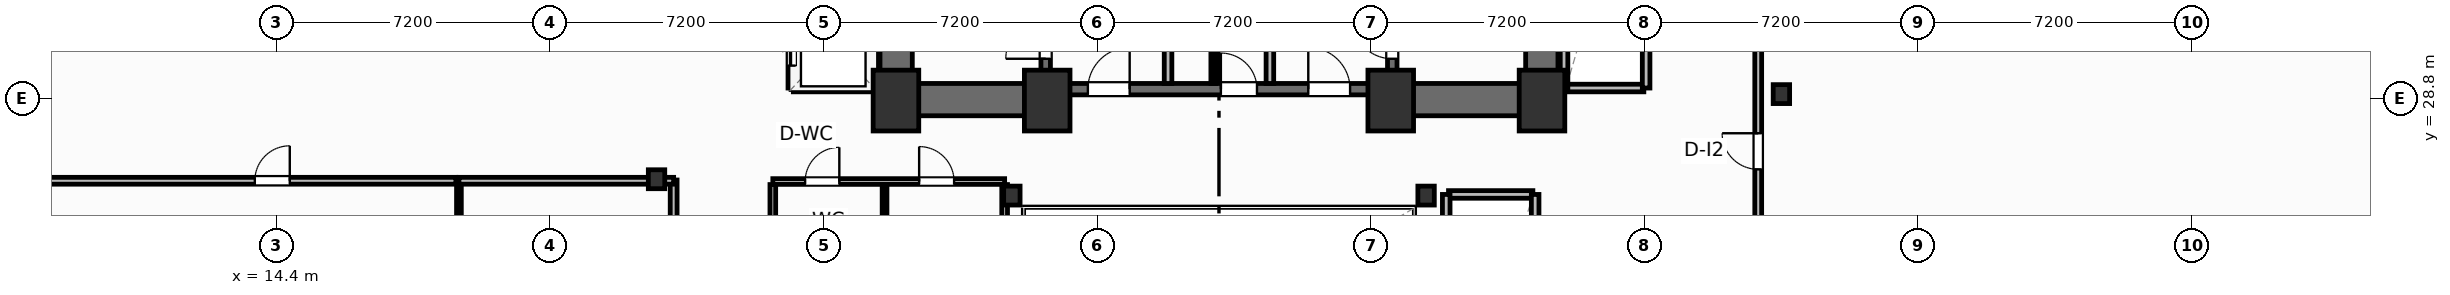
"""IFC4 building model, lengths in metres.
Left out: names, types, materials, properties, quantities, classifications, styles, units other than length and angle.
Written with IfcOpenShell. Run it as: python <this file> out.ifc"""

import sys

from ifc_helpers import new_model, si_unit, direction, frame, frame_2d, origin, origin_2d, place, context, subcontext, project, spatial, rectangle, i_section, extrude, element, fill, save


model = new_model("IFC4")
c1 = context("Model", 3, precision=1e-05, world=origin(), true_north=direction((0.0, 1.0)))
c2 = subcontext(c1, "Body", "Model", "MODEL_VIEW")
j1 = project(units=[si_unit("LENGTHUNIT", "METRE"), si_unit("PLANEANGLEUNIT", "RADIAN")], contexts=[c1])
p1 = place(None, origin())
s1 = spatial("IfcSite", under=j1, at=p1, CompositionType="ELEMENT")
p2 = place(p1, origin())
s2 = spatial("IfcBuilding", under=s1, at=p2, CompositionType="ELEMENT")
p3 = place(p2, frame((0.0, 0.0, 49.2)))
s3 = spatial("IfcBuildingStorey", under=s2, at=p3, CompositionType="ELEMENT", Elevation=49.2)
for number, where, z_axis, x_axis in (
    (1, (30.7, 28.75, 0.0), (0.0, 0.0, 1.0), (1.0, 0.0, 0.0)),
    (2, (34.68, 28.75, 0.0), (0.0, 0.0, 1.0), (1.0, 0.0, 0.0)),
    (3, (43.72, 28.75, 0.0), (0.0, 0.0, 1.0), (1.0, 0.0, 0.0)),
    (4, (47.7, 28.75, 0.0), (0.0, 0.0, 1.0), (1.0, 0.0, 0.0)),
):
    element("IfcColumn", number, at=place(p3, frame(where, z_axis=z_axis, x_axis=x_axis)), inside=s3, PredefinedType="COLUMN", context=c2, shape_type="SweptSolid", body=[
        extrude(rectangle(XDim=1.2, YDim=1.6, at=origin_2d()), origin(), (0.0, 0.0, 1.0), 3.7),
    ])
for number, where, z_axis, x_axis in (
    (5, (33.75, 26.25, 0.0), (0.0, 0.0, 1.0), (1.0, 0.0, 0.0)),
    (6, (44.65, 26.25, 0.0), (0.0, 0.0, 1.0), (1.0, 0.0, 0.0)),
    (7, (24.4, 26.68, 0.0), (0.0, 0.0, 1.0), (1.0, 0.0, 0.0)),
    (8, (54.0, 28.92, 0.0), (0.0, 0.0, 1.0), (1.0, 0.0, 0.0)),
):
    element("IfcColumn", number, at=place(p3, frame(where, z_axis=z_axis, x_axis=x_axis)), inside=s3, PredefinedType="COLUMN", context=c2, shape_type="SweptSolid", body=[
        extrude(i_section(OverallWidth=0.432, OverallDepth=0.498, WebThickness=0.056, FlangeThickness=0.089, FilletRadius=0.025, at=origin_2d()), origin(), (0.0, 0.0, 1.0), 3.7),
    ])
for number, where, z_axis, x_axis in (
    (9, (30.705, 29.2, 0.0), (0.0, 0.0, 1.0), (0.0, 1.0, 0.0)),
    (10, (47.695, 29.2, 0.0), (0.0, 0.0, 1.0), (0.0, 1.0, 0.0)),
):
    element("IfcWall", number, at=place(p3, frame(where, z_axis=z_axis, x_axis=x_axis)), inside=s3, PredefinedType="SHEAR", context=c2, shape_type="SweptSolid", body=[
        extrude(rectangle(XDim=9.22, YDim=0.85, at=frame_2d((4.61, 0.0))), origin(), (0.0, 0.0, 1.0), 3.45),
    ])
for number, where, z_axis, x_axis in (
    (11, (30.28, 28.775, 0.0), (0.0, 0.0, 1.0), (1.0, 0.0, 0.0)),
    (12, (43.6, 28.775, 0.0), (0.0, 0.0, 1.0), (1.0, 0.0, 0.0)),
):
    element("IfcWall", number, at=place(p3, frame(where, z_axis=z_axis, x_axis=x_axis)), inside=s3, PredefinedType="SHEAR", context=c2, shape_type="SweptSolid", body=[
        extrude(rectangle(XDim=4.52, YDim=0.85, at=frame_2d((2.26, 0.0))), origin(), (0.0, 0.0, 1.0), 3.45),
    ])
p4 = place(p3, frame((34.8, 29.05, 0.0), z_axis=(0.0, 0.0, 1.0), x_axis=(1.0, 0.0, 0.0)))
e13 = element("IfcWall", 13, at=p4, inside=s3, PredefinedType="SHEAR", context=c2, shape_type="SweptSolid", body=[
    extrude(rectangle(XDim=8.8, YDim=0.3, at=frame_2d((4.4, 0.0))), origin(), (0.0, 0.0, 1.0), 3.45),
])
p5 = place(p4, frame((0.95, 0.0, 0.0)))
e14 = element("IfcOpeningElement", 14, at=p5, cuts=e13, PredefinedType="OPENING", context=c2, shape_type="SweptSolid", body=[
    extrude(rectangle(XDim=1.1, YDim=2.15, at=frame_2d((0.55, 1.075))), frame((0.0, 0.16, 0.0), z_axis=(0.0, -1.0, 0.0), x_axis=(1.0, 0.0, 0.0)), (0.0, 0.0, 1.0), 0.32),
])
p6 = place(p4, frame((6.75, 0.0, 0.0)))
e15 = element("IfcOpeningElement", 15, at=p6, cuts=e13, PredefinedType="OPENING", context=c2, shape_type="SweptSolid", body=[
    extrude(rectangle(XDim=1.1, YDim=2.15, at=frame_2d((0.55, 1.075))), frame((0.0, 0.16, 0.0), z_axis=(0.0, -1.0, 0.0), x_axis=(1.0, 0.0, 0.0)), (0.0, 0.0, 1.0), 0.32),
])
p7 = place(p4, frame((4.45, 0.0, 0.0)))
e16 = element("IfcOpeningElement", 16, at=p7, cuts=e13, PredefinedType="OPENING", context=c2, shape_type="SweptSolid", body=[
    extrude(rectangle(XDim=0.95, YDim=2.15, at=frame_2d((0.475, 1.075))), frame((0.0, 0.16, 0.0), z_axis=(0.0, -1.0, 0.0), x_axis=(1.0, 0.0, 0.0)), (0.0, 0.0, 1.0), 0.32),
])
p8 = place(p3, frame((34.64, 29.2, 0.0), z_axis=(0.0, 0.0, 1.0), x_axis=(0.0, 1.0, 0.0)))
e17 = element("IfcWall", 17, at=p8, inside=s3, PredefinedType="SHEAR", context=c2, shape_type="SweptSolid", body=[
    extrude(rectangle(XDim=9.22, YDim=0.25, at=frame_2d((4.61, 0.0))), origin(), (0.0, 0.0, 1.0), 3.45),
])
p9 = place(p8, frame((0.65, 0.0, 0.0)))
e18 = element("IfcOpeningElement", 18, at=p9, cuts=e17, PredefinedType="OPENING", context=c2, shape_type="SweptSolid", body=[
    extrude(rectangle(XDim=1.05, YDim=2.15, at=frame_2d((0.525, 1.075))), frame((0.0, 0.135, 0.0), z_axis=(0.0, -1.0, 0.0), x_axis=(1.0, 0.0, 0.0)), (0.0, 0.0, 1.0), 0.27),
])
p10 = place(p3, frame((43.76, 29.2, 0.0), z_axis=(0.0, 0.0, 1.0), x_axis=(0.0, 1.0, 0.0)))
e19 = element("IfcWall", 19, at=p10, inside=s3, PredefinedType="SHEAR", context=c2, shape_type="SweptSolid", body=[
    extrude(rectangle(XDim=9.22, YDim=0.25, at=frame_2d((4.61, 0.0))), origin(), (0.0, 0.0, 1.0), 3.45),
])
p11 = place(p10, frame((0.65, 0.0, 0.0)))
e20 = element("IfcOpeningElement", 20, at=p11, cuts=e19, PredefinedType="OPENING", context=c2, shape_type="SweptSolid", body=[
    extrude(rectangle(XDim=1.05, YDim=2.15, at=frame_2d((0.525, 1.075))), frame((0.0, 0.135, 0.0), z_axis=(0.0, -1.0, 0.0), x_axis=(1.0, 0.0, 0.0)), (0.0, 0.0, 1.0), 0.27),
])
p12 = place(p3, frame((81.127, 26.995, 0.0), z_axis=(0.0, 0.0, 1.0), x_axis=(-0.823530169317, 0.567272474411, 0.0)))
e21 = element("IfcWall", 21, at=p12, inside=s3, PredefinedType="SOLIDWALL", context=c2, shape_type="SweptSolid", body=[
    extrude(rectangle(XDim=23.247, YDim=0.22, at=frame_2d((11.624, 0.0))), origin(), (0.0, 0.0, 1.0), 2.73),
])
p13 = place(p12, frame((10.799, 0.0, 0.8)))
e22 = element("IfcOpeningElement", 22, at=p13, cuts=e21, PredefinedType="OPENING", context=c2, shape_type="SweptSolid", body=[
    extrude(rectangle(XDim=1.65, YDim=1.65, at=frame_2d((0.825, 0.825))), frame((0.0, 0.12, 0.0), z_axis=(0.0, -1.0, 0.0), x_axis=(1.0, 0.0, 0.0)), (0.0, 0.0, 1.0), 0.24),
])
p14 = place(p3, frame((1.0, 26.64, 0.0), z_axis=(0.0, 0.0, 1.0), x_axis=(1.0, 0.0, 0.0)))
e23 = element("IfcWall", 23, at=p14, inside=s3, PredefinedType="PARTITIONING", context=c2, shape_type="SweptSolid", body=[
    extrude(rectangle(XDim=18.12, YDim=0.18, at=frame_2d((9.06, 0.0))), origin(), (0.0, 0.0, 1.0), 3.45),
])
p15 = place(p14, frame((12.829, 0.0, 0.0)))
e24 = element("IfcOpeningElement", 24, at=p15, cuts=e23, PredefinedType="OPENING", context=c2, shape_type="SweptSolid", body=[
    extrude(rectangle(XDim=0.92, YDim=2.05, at=frame_2d((0.46, 1.025))), frame((0.0, 0.1, 0.0), z_axis=(0.0, -1.0, 0.0), x_axis=(1.0, 0.0, 0.0)), (0.0, 0.0, 1.0), 0.2),
])
p16 = place(p3, frame((24.85, 19.24, 0.0), z_axis=(0.0, 0.0, 1.0), x_axis=(0.0, 1.0, 0.0)))
e25 = element("IfcWall", 25, at=p16, inside=s3, PredefinedType="PARTITIONING", context=c2, shape_type="SweptSolid", body=[
    extrude(rectangle(XDim=7.42, YDim=0.18, at=frame_2d((3.71, 0.0))), origin(), (0.0, 0.0, 1.0), 3.45),
])
p17 = place(p16, frame((2.4, 0.0, 0.0)))
e26 = element("IfcOpeningElement", 26, at=p17, cuts=e25, PredefinedType="OPENING", context=c2, shape_type="SweptSolid", body=[
    extrude(rectangle(XDim=0.92, YDim=2.05, at=frame_2d((0.46, 1.025))), frame((0.0, 0.1, 0.0), z_axis=(0.0, -1.0, 0.0), x_axis=(1.0, 0.0, 0.0)), (0.0, 0.0, 1.0), 0.2),
])
p18 = place(p3, frame((19.2, 19.24, 0.0), z_axis=(0.0, 0.0, 1.0), x_axis=(0.0, 1.0, 0.0)))
e27 = element("IfcWall", 27, at=p18, inside=s3, PredefinedType="PARTITIONING", context=c2, shape_type="SweptSolid", body=[
    extrude(rectangle(XDim=7.42, YDim=0.125, at=frame_2d((3.71, 0.0))), origin(), (0.0, 0.0, 1.0), 3.45),
])
p19 = place(p3, frame((19.2, 26.64, 0.0), z_axis=(0.0, 0.0, 1.0), x_axis=(1.0, 0.0, 0.0)))
e28 = element("IfcWall", 28, at=p19, inside=s3, PredefinedType="PARTITIONING", context=c2, shape_type="SweptSolid", body=[
    extrude(rectangle(XDim=5.65, YDim=0.18, at=frame_2d((2.825, 0.0))), origin(), (0.0, 0.0, 1.0), 2.662),
])
p20 = place(p3, frame((53.39, 19.24, 0.0), z_axis=(0.0, 0.0, 1.0), x_axis=(0.0, 1.0, 0.0)))
e29 = element("IfcWall", 29, at=p20, inside=s3, PredefinedType="PARTITIONING", context=c2, shape_type="SweptSolid", body=[
    extrude(rectangle(XDim=20.06, YDim=0.18, at=frame_2d((10.03, 0.0))), origin(), (0.0, 0.0, 1.0), 3.45),
])
p21 = place(p20, frame((7.7, 0.0, 0.0)))
e30 = element("IfcOpeningElement", 30, at=p21, cuts=e29, PredefinedType="OPENING", context=c2, shape_type="SweptSolid", body=[
    extrude(rectangle(XDim=0.95, YDim=2.05, at=frame_2d((0.475, 1.025))), frame((0.0, 0.1, 0.0), z_axis=(0.0, -1.0, 0.0), x_axis=(1.0, 0.0, 0.0)), (0.0, 0.0, 1.0), 0.2),
])
for number, where, z_axis, x_axis in (
    (31, (37.86, 29.2, 0.0), (0.0, 0.0, 1.0), (0.0, 1.0, 0.0)),
    (32, (40.54, 29.2, 0.0), (0.0, 0.0, 1.0), (0.0, 1.0, 0.0)),
):
    element("IfcWall", number, at=place(p3, frame(where, z_axis=z_axis, x_axis=x_axis)), inside=s3, PredefinedType="PARTITIONING", context=c2, shape_type="SweptSolid", body=[
        extrude(rectangle(XDim=5.18, YDim=0.2, at=frame_2d((2.59, 0.0))), origin(), (0.0, 0.0, 1.0), 3.45),
    ])
p22 = place(p3, frame((39.05, 29.2, 0.0), z_axis=(0.0, 0.0, 1.0), x_axis=(0.0, 1.0, 0.0)))
e33 = element("IfcWall", 33, at=p22, inside=s3, PredefinedType="PARTITIONING", context=c2, shape_type="SweptSolid", body=[
    extrude(rectangle(XDim=5.22, YDim=0.125, at=frame_2d((2.61, 0.0))), origin(), (0.0, 0.0, 1.0), 3.45),
])
p23 = place(p22, frame((2.05, 0.0, 0.0)))
e34 = element("IfcOpeningElement", 34, at=p23, cuts=e33, PredefinedType="OPENING", context=c2, shape_type="SweptSolid", body=[
    extrude(rectangle(XDim=0.85, YDim=2.05, at=frame_2d((0.425, 1.025))), frame((0.0, 0.073, 0.0), z_axis=(0.0, -1.0, 0.0), x_axis=(1.0, 0.0, 0.0)), (0.0, 0.0, 1.0), 0.145),
])
p24 = place(p3, frame((27.46, 26.62, 0.0), z_axis=(0.0, 0.0, 1.0), x_axis=(1.0, 0.0, 0.0)))
e35 = element("IfcWall", 35, at=p24, inside=s3, PredefinedType="PARTITIONING", context=c2, shape_type="SweptSolid", body=[
    extrude(rectangle(XDim=6.1, YDim=0.15, at=frame_2d((3.05, 0.0))), origin(), (0.0, 0.0, 1.0), 2.662),
])
p25 = place(p24, frame((0.85, 0.0, 0.0)))
e36 = element("IfcOpeningElement", 36, at=p25, cuts=e35, PredefinedType="OPENING", context=c2, shape_type="SweptSolid", body=[
    extrude(rectangle(XDim=0.9, YDim=2.05, at=frame_2d((0.45, 1.025))), frame((0.0, 0.085, 0.0), z_axis=(0.0, -1.0, 0.0), x_axis=(1.0, 0.0, 0.0)), (0.0, 0.0, 1.0), 0.17),
])
p26 = place(p24, frame((3.85, 0.0, 0.0)))
e37 = element("IfcOpeningElement", 37, at=p26, cuts=e35, PredefinedType="OPENING", context=c2, shape_type="SweptSolid", body=[
    extrude(rectangle(XDim=0.92, YDim=2.05, at=frame_2d((0.46, 1.025))), frame((0.0, 0.085, 0.0), z_axis=(0.0, -1.0, 0.0), x_axis=(1.0, 0.0, 0.0)), (0.0, 0.0, 1.0), 0.17),
])
p27 = place(p3, frame((30.4, 23.0, 0.0), z_axis=(0.0, 0.0, 1.0), x_axis=(0.0, 1.0, 0.0)))
e38 = element("IfcWall", 38, at=p27, inside=s3, PredefinedType="PARTITIONING", context=c2, shape_type="SweptSolid", body=[
    extrude(rectangle(XDim=3.54, YDim=0.125, at=frame_2d((1.77, 0.0))), origin(), (0.0, 0.0, 1.0), 3.45),
])
p28 = place(p3, frame((27.46, 19.38, 0.0), z_axis=(0.0, 0.0, 1.0), x_axis=(0.0, 1.0, 0.0)))
e39 = element("IfcWall", 39, at=p28, inside=s3, PredefinedType="PARTITIONING", context=c2, shape_type="SweptSolid", body=[
    extrude(rectangle(XDim=7.16, YDim=0.15, at=frame_2d((3.58, 0.0))), origin(), (0.0, 0.0, 1.0), 3.45),
])
p29 = place(p28, frame((1.1, 0.0, 0.0)))
e40 = element("IfcOpeningElement", 40, at=p29, cuts=e39, PredefinedType="OPENING", context=c2, shape_type="SweptSolid", body=[
    extrude(rectangle(XDim=0.95, YDim=2.05, at=frame_2d((0.475, 1.025))), frame((0.0, 0.085, 0.0), z_axis=(0.0, -1.0, 0.0), x_axis=(1.0, 0.0, 0.0)), (0.0, 0.0, 1.0), 0.17),
])
p30 = place(p3, frame((33.56, 19.38, 0.0), z_axis=(0.0, 0.0, 1.0), x_axis=(0.0, 1.0, 0.0)))
e41 = element("IfcWall", 41, at=p30, inside=s3, PredefinedType="PARTITIONING", context=c2, shape_type="SweptSolid", body=[
    extrude(rectangle(XDim=7.16, YDim=0.15, at=frame_2d((3.58, 0.0))), origin(), (0.0, 0.0, 1.0), 2.824),
])
p31 = place(p3, frame((28.0, 29.08, 0.0), z_axis=(0.0, 0.0, 1.0), x_axis=(1.0, 0.0, 0.0)))
e42 = element("IfcWall", 42, at=p31, inside=s3, PredefinedType="PARTITIONING", context=c2, shape_type="SweptSolid", body=[
    extrude(rectangle(XDim=2.1, YDim=0.2, at=frame_2d((1.05, 0.0))), origin(), (0.0, 0.0, 1.0), 3.45),
])
p32 = place(p3, frame((30.12, 29.08, 0.0), z_axis=(0.0, 0.0, 1.0), x_axis=(0.0, 1.0, 0.0)))
e43 = element("IfcWall", 43, at=p32, inside=s3, PredefinedType="PARTITIONING", context=c2, shape_type="SweptSolid", body=[
    extrude(rectangle(XDim=6.89, YDim=0.2, at=frame_2d((3.445, 0.0))), origin(), (0.0, 0.0, 1.0), 3.45),
])
p33 = place(p3, frame((27.96, 29.08, 0.0), z_axis=(0.0, 0.0, 1.0), x_axis=(0.0, 1.0, 0.0)))
e44 = element("IfcWall", 44, at=p33, inside=s3, PredefinedType="PARTITIONING", context=c2, shape_type="SweptSolid", body=[
    extrude(rectangle(XDim=6.89, YDim=0.2, at=frame_2d((3.445, 0.0))), origin(), (0.0, 0.0, 1.0), 3.45),
])
p34 = place(p33, frame((0.59, 0.0, 0.0)))
e45 = element("IfcOpeningElement", 45, at=p34, cuts=e44, PredefinedType="OPENING", context=c2, shape_type="SweptSolid", body=[
    extrude(rectangle(XDim=1.1, YDim=2.15, at=frame_2d((0.55, 1.075))), frame((0.0, 0.11, 0.0), z_axis=(0.0, -1.0, 0.0), x_axis=(1.0, 0.0, 0.0)), (0.0, 0.0, 1.0), 0.22),
])
p35 = place(p33, frame((2.89, 0.0, 0.0)))
e46 = element("IfcOpeningElement", 46, at=p35, cuts=e44, PredefinedType="OPENING", context=c2, shape_type="SweptSolid", body=[
    extrude(rectangle(XDim=1.1, YDim=2.15, at=frame_2d((0.55, 1.075))), frame((0.0, 0.11, 0.0), z_axis=(0.0, -1.0, 0.0), x_axis=(1.0, 0.0, 0.0)), (0.0, 0.0, 1.0), 0.22),
])
p36 = place(p33, frame((5.19, 0.0, 0.0)))
e47 = element("IfcOpeningElement", 47, at=p36, cuts=e44, PredefinedType="OPENING", context=c2, shape_type="SweptSolid", body=[
    extrude(rectangle(XDim=1.1, YDim=2.15, at=frame_2d((0.55, 1.075))), frame((0.0, 0.11, 0.0), z_axis=(0.0, -1.0, 0.0), x_axis=(1.0, 0.0, 0.0)), (0.0, 0.0, 1.0), 0.22),
])
p37 = place(p3, frame((48.32, 29.08, 0.0), z_axis=(0.0, 0.0, 1.0), x_axis=(1.0, 0.0, 0.0)))
e48 = element("IfcWall", 48, at=p37, inside=s3, PredefinedType="PARTITIONING", context=c2, shape_type="SweptSolid", body=[
    extrude(rectangle(XDim=2.06, YDim=0.2, at=frame_2d((1.03, 0.0))), origin(), (0.0, 0.0, 1.0), 2.662),
])
for number, where, z_axis, x_axis in (
    (49, (48.28, 29.08, 0.0), (0.0, 0.0, 1.0), (0.0, 1.0, 0.0)),
    (50, (50.44, 29.08, 0.0), (0.0, 0.0, 1.0), (0.0, 1.0, 0.0)),
):
    element("IfcWall", number, at=place(p3, frame(where, z_axis=z_axis, x_axis=x_axis)), inside=s3, PredefinedType="PARTITIONING", context=c2, shape_type="SweptSolid", body=[
        extrude(rectangle(XDim=6.89, YDim=0.2, at=frame_2d((3.445, 0.0))), origin(), (0.0, 0.0, 1.0), 3.45),
    ])
p38 = place(p3, frame((45.24, 26.28, 0.0), z_axis=(0.0, 0.0, 1.0), x_axis=(1.0, 0.0, 0.0)))
e51 = element("IfcWall", 51, at=p38, inside=s3, PredefinedType="PARTITIONING", context=c2, shape_type="SweptSolid", body=[
    extrude(rectangle(XDim=2.22, YDim=0.2, at=frame_2d((1.11, 0.0))), origin(), (0.0, 0.0, 1.0), 3.45),
])
for number, where, z_axis, x_axis in (
    (52, (45.18, 19.38, 0.0), (0.0, 0.0, 1.0), (0.0, 1.0, 0.0)),
    (53, (47.52, 19.38, 0.0), (0.0, 0.0, 1.0), (0.0, 1.0, 0.0)),
):
    element("IfcWall", number, at=place(p3, frame(where, z_axis=z_axis, x_axis=x_axis)), inside=s3, PredefinedType="PARTITIONING", context=c2, shape_type="SweptSolid", body=[
        extrude(rectangle(XDim=6.9, YDim=0.2, at=frame_2d((3.45, 0.0))), origin(), (0.0, 0.0, 1.0), 3.45),
    ])
p39 = place(p15, origin())
e54 = element("IfcDoor", 54, at=p39, inside=s3, OperationType="SINGLE_SWING_RIGHT", PredefinedType="DOOR", context=c2, shape_type="SweptSolid", body=[
    extrude(rectangle(XDim=0.92, YDim=2.05, at=frame_2d((0.46, 1.025))), frame((0.0, 0.025, 0.0), z_axis=(0.0, -1.0, 0.0), x_axis=(1.0, 0.0, 0.0)), (0.0, 0.0, 1.0), 0.05),
])
fill(e24, e54)
p40 = place(p21, origin())
e55 = element("IfcDoor", 55, at=p40, inside=s3, OperationType="SINGLE_SWING_RIGHT", PredefinedType="DOOR", context=c2, shape_type="SweptSolid", body=[
    extrude(rectangle(XDim=0.95, YDim=2.05, at=frame_2d((0.475, 1.025))), frame((0.0, 0.025, 0.0), z_axis=(0.0, -1.0, 0.0), x_axis=(1.0, 0.0, 0.0)), (0.0, 0.0, 1.0), 0.05),
])
fill(e30, e55)
p41 = place(p9, origin())
e56 = element("IfcDoor", 56, at=p41, inside=s3, OperationType="SINGLE_SWING_LEFT", PredefinedType="DOOR", context=c2, shape_type="SweptSolid", body=[
    extrude(rectangle(XDim=1.05, YDim=2.15, at=frame_2d((0.525, 1.075))), frame((0.0, 0.025, 0.0), z_axis=(0.0, -1.0, 0.0), x_axis=(1.0, 0.0, 0.0)), (0.0, 0.0, 1.0), 0.05),
])
fill(e18, e56)
p42 = place(p11, origin())
e57 = element("IfcDoor", 57, at=p42, inside=s3, OperationType="SINGLE_SWING_RIGHT", PredefinedType="DOOR", context=c2, shape_type="SweptSolid", body=[
    extrude(rectangle(XDim=1.05, YDim=2.15, at=frame_2d((0.525, 1.075))), frame((0.0, 0.025, 0.0), z_axis=(0.0, -1.0, 0.0), x_axis=(1.0, 0.0, 0.0)), (0.0, 0.0, 1.0), 0.05),
])
fill(e20, e57)
p43 = place(p5, origin())
e58 = element("IfcDoor", 58, at=p43, inside=s3, OperationType="SINGLE_SWING_RIGHT", PredefinedType="DOOR", context=c2, shape_type="SweptSolid", body=[
    extrude(rectangle(XDim=1.1, YDim=2.15, at=frame_2d((0.55, 1.075))), frame((0.0, 0.025, 0.0), z_axis=(0.0, -1.0, 0.0), x_axis=(1.0, 0.0, 0.0)), (0.0, 0.0, 1.0), 0.05),
])
fill(e14, e58)
p44 = place(p6, origin())
e59 = element("IfcDoor", 59, at=p44, inside=s3, OperationType="SINGLE_SWING_LEFT", PredefinedType="DOOR", context=c2, shape_type="SweptSolid", body=[
    extrude(rectangle(XDim=1.1, YDim=2.15, at=frame_2d((0.55, 1.075))), frame((0.0, 0.025, 0.0), z_axis=(0.0, -1.0, 0.0), x_axis=(1.0, 0.0, 0.0)), (0.0, 0.0, 1.0), 0.05),
])
fill(e15, e59)
p45 = place(p7, origin())
e60 = element("IfcDoor", 60, at=p45, inside=s3, OperationType="SINGLE_SWING_LEFT", PredefinedType="DOOR", context=c2, shape_type="SweptSolid", body=[
    extrude(rectangle(XDim=0.95, YDim=2.15, at=frame_2d((0.475, 1.075))), frame((0.0, 0.025, 0.0), z_axis=(0.0, -1.0, 0.0), x_axis=(1.0, 0.0, 0.0)), (0.0, 0.0, 1.0), 0.05),
])
fill(e16, e60)
p46 = place(p25, origin())
e61 = element("IfcDoor", 61, at=p46, inside=s3, OperationType="SINGLE_SWING_RIGHT", PredefinedType="DOOR", context=c2, shape_type="SweptSolid", body=[
    extrude(rectangle(XDim=0.9, YDim=2.05, at=frame_2d((0.45, 1.025))), frame((0.0, 0.025, 0.0), z_axis=(0.0, -1.0, 0.0), x_axis=(1.0, 0.0, 0.0)), (0.0, 0.0, 1.0), 0.05),
])
fill(e36, e61)
p47 = place(p26, origin())
e62 = element("IfcDoor", 62, at=p47, inside=s3, OperationType="SINGLE_SWING_LEFT", PredefinedType="DOOR", context=c2, shape_type="SweptSolid", body=[
    extrude(rectangle(XDim=0.92, YDim=2.05, at=frame_2d((0.46, 1.025))), frame((0.0, 0.025, 0.0), z_axis=(0.0, -1.0, 0.0), x_axis=(1.0, 0.0, 0.0)), (0.0, 0.0, 1.0), 0.05),
])
fill(e37, e62)
p48 = place(p34, origin())
e63 = element("IfcDoor", 63, at=p48, inside=s3, OperationType="SLIDING_TO_LEFT", PredefinedType="DOOR", context=c2, shape_type="SweptSolid", body=[
    extrude(rectangle(XDim=1.1, YDim=2.15, at=frame_2d((0.55, 1.075))), frame((0.0, 0.025, 0.0), z_axis=(0.0, -1.0, 0.0), x_axis=(1.0, 0.0, 0.0)), (0.0, 0.0, 1.0), 0.05),
])
fill(e45, e63)
save(model, sys.argv[1])
